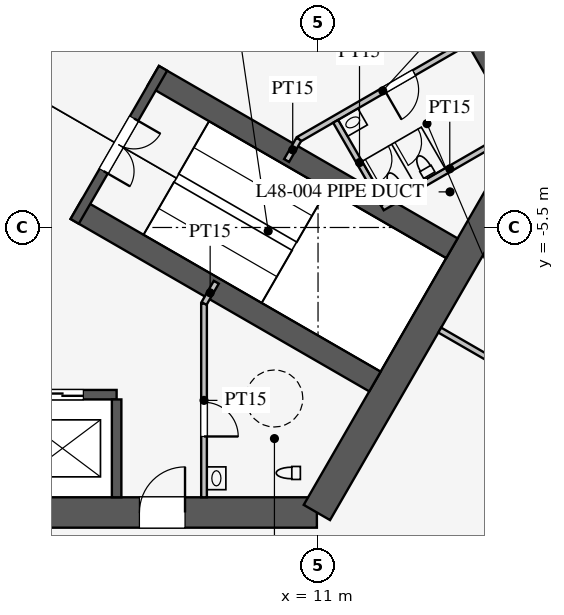
"""IFC4 building model, lengths in metres.
Left out: names, types, materials, properties, quantities, classifications, styles, units other than length and angle.
Written with IfcOpenShell. Run it as: python <this file> out.ifc"""

import sys

from ifc_helpers import new_model, si_unit, direction, frame, frame_2d, origin, place, context, subcontext, project, spatial, rectangle, extrude, element, fill, save


model = new_model("IFC4")
c1 = context("Model", 3, precision=1e-05, world=origin(), true_north=direction((0.0, 1.0)))
c2 = subcontext(c1, "Body", "Model", "MODEL_VIEW")
j1 = project(units=[si_unit("LENGTHUNIT", "METRE"), si_unit("PLANEANGLEUNIT", "RADIAN")], contexts=[c1])
p1 = place(None, origin())
s1 = spatial("IfcSite", under=j1, at=p1, CompositionType="ELEMENT")
p2 = place(p1, origin())
s2 = spatial("IfcBuilding", under=s1, at=p2, CompositionType="ELEMENT")
p3 = place(p2, frame((0.0, 0.0, 210.7)))
s3 = spatial("IfcBuildingStorey", under=s2, at=p3, CompositionType="ELEMENT", Elevation=210.7)
p4 = place(p3, frame((-10.97, -13.0, 0.0), z_axis=(0.0, 0.0, 1.0), x_axis=(1.0, 0.0, 0.0)))
e1 = element("IfcWall", 1, at=p4, inside=s3, PredefinedType="SHEAR", context=c2, shape_type="SweptSolid", body=[
    extrude(rectangle(XDim=21.939, YDim=0.8, at=frame_2d((10.97, 0.0))), origin(), (0.0, 0.0, 1.0), 4.2),
])
p5 = place(p4, frame((17.27, 0.0, 0.0)))
e2 = element("IfcOpeningElement", 2, at=p5, cuts=e1, PredefinedType="OPENING", context=c2, shape_type="SweptSolid", body=[
    extrude(rectangle(XDim=1.2, YDim=2.1, at=frame_2d((0.6, 1.05))), frame((0.0, 0.41, 0.0), z_axis=(0.0, -1.0, 0.0), x_axis=(1.0, 0.0, 0.0)), (0.0, 0.0, 1.0), 0.82),
])
p6 = place(p4, frame((3.47, 0.0, 0.0)))
e3 = element("IfcOpeningElement", 3, at=p6, cuts=e1, PredefinedType="OPENING", context=c2, shape_type="SweptSolid", body=[
    extrude(rectangle(XDim=1.2, YDim=2.1, at=frame_2d((0.6, 1.05))), frame((0.0, 0.41, 0.0), z_axis=(0.0, -1.0, 0.0), x_axis=(1.0, 0.0, 0.0)), (0.0, 0.0, 1.0), 0.82),
])
p7 = place(p3, frame((10.97, -13.0, 0.0), z_axis=(0.0, 0.0, 1.0), x_axis=(0.499995765644, 0.866027848477, 0.0)))
e4 = element("IfcWall", 4, at=p7, inside=s3, PredefinedType="SHEAR", context=c2, shape_type="SweptSolid", body=[
    extrude(rectangle(XDim=11.547, YDim=0.8, at=frame_2d((5.773, 0.0))), origin(), (0.0, 0.0, 1.0), 4.2),
])
p8 = place(p3, frame((16.743, -3.0, 0.0), z_axis=(0.0, 0.0, 1.0), x_axis=(-0.500002442456, 0.866023993627, 0.0)))
e5 = element("IfcWall", 5, at=p8, inside=s3, PredefinedType="SHEAR", context=c2, shape_type="SweptSolid", body=[
    extrude(rectangle(XDim=21.939, YDim=0.8, at=frame_2d((10.97, 0.0))), origin(), (0.0, 0.0, 1.0), 4.2),
])
p9 = place(p8, frame((17.27, 0.0, 0.0)))
e6 = element("IfcOpeningElement", 6, at=p9, cuts=e5, PredefinedType="OPENING", context=c2, shape_type="SweptSolid", body=[
    extrude(rectangle(XDim=1.2, YDim=2.1, at=frame_2d((0.6, 1.05))), frame((0.0, 0.41, 0.0), z_axis=(0.0, -1.0, 0.0), x_axis=(1.0, 0.0, 0.0)), (0.0, 0.0, 1.0), 0.82),
])
p10 = place(p8, frame((3.47, 0.0, 0.0)))
e7 = element("IfcOpeningElement", 7, at=p10, cuts=e5, PredefinedType="OPENING", context=c2, shape_type="SweptSolid", body=[
    extrude(rectangle(XDim=1.2, YDim=2.1, at=frame_2d((0.6, 1.05))), frame((0.0, 0.41, 0.0), z_axis=(0.0, -1.0, 0.0), x_axis=(1.0, 0.0, 0.0)), (0.0, 0.0, 1.0), 0.82),
])
p11 = place(p3, frame((-5.7, -9.9, 0.0), z_axis=(0.0, 0.0, 1.0), x_axis=(1.0, 0.0, 0.0)))
e8 = element("IfcWall", 8, at=p11, inside=s3, PredefinedType="SHEAR", context=c2, shape_type="SweptSolid", body=[
    extrude(rectangle(XDim=11.4, YDim=0.25, at=frame_2d((5.7, 0.0))), origin(), (0.0, 0.0, 1.0), 4.2),
])
p12 = place(p11, frame((0.875, 0.0, 0.0)))
e9 = element("IfcOpeningElement", 9, at=p12, cuts=e8, PredefinedType="OPENING", context=c2, shape_type="SweptSolid", body=[
    extrude(rectangle(XDim=1.1, YDim=2.2, at=frame_2d((0.55, 1.1))), frame((0.0, 0.135, 0.0), z_axis=(0.0, -1.0, 0.0), x_axis=(1.0, 0.0, 0.0)), (0.0, 0.0, 1.0), 0.27),
])
p13 = place(p11, frame((3.725, 0.0, 0.0)))
e10 = element("IfcOpeningElement", 10, at=p13, cuts=e8, PredefinedType="OPENING", context=c2, shape_type="SweptSolid", body=[
    extrude(rectangle(XDim=1.1, YDim=2.2, at=frame_2d((0.55, 1.1))), frame((0.0, 0.135, 0.0), z_axis=(0.0, -1.0, 0.0), x_axis=(1.0, 0.0, 0.0)), (0.0, 0.0, 1.0), 0.27),
])
p14 = place(p11, frame((6.575, 0.0, 0.0)))
e11 = element("IfcOpeningElement", 11, at=p14, cuts=e8, PredefinedType="OPENING", context=c2, shape_type="SweptSolid", body=[
    extrude(rectangle(XDim=1.1, YDim=2.2, at=frame_2d((0.55, 1.1))), frame((0.0, 0.135, 0.0), z_axis=(0.0, -1.0, 0.0), x_axis=(1.0, 0.0, 0.0)), (0.0, 0.0, 1.0), 0.27),
])
p15 = place(p11, frame((9.425, 0.0, 0.0)))
e12 = element("IfcOpeningElement", 12, at=p15, cuts=e8, PredefinedType="OPENING", context=c2, shape_type="SweptSolid", body=[
    extrude(rectangle(XDim=1.1, YDim=2.2, at=frame_2d((0.55, 1.1))), frame((0.0, 0.135, 0.0), z_axis=(0.0, -1.0, 0.0), x_axis=(1.0, 0.0, 0.0)), (0.0, 0.0, 1.0), 0.27),
])
p16 = place(p3, frame((5.7, -10.025, 0.0), z_axis=(0.0, 0.0, 1.0), x_axis=(0.0, -1.0, 0.0)))
e13 = element("IfcWall", 13, at=p16, inside=s3, PredefinedType="SHEAR", context=c2, shape_type="SweptSolid", body=[
    extrude(rectangle(XDim=2.575, YDim=0.25, at=frame_2d((1.288, 0.0))), origin(), (0.0, 0.0, 1.0), 4.2),
])
for number, where, z_axis, x_axis in (
    (14, (4.638, -5.016, 0.0), (0.0, 0.0, 1.0), (0.866, -0.5, 0.0)),
    (15, (6.663, -1.509, 0.0), (0.0, 0.0, 1.0), (0.866, -0.5, 0.0)),
):
    element("IfcWall", number, at=place(p3, frame(where, z_axis=z_axis, x_axis=x_axis)), inside=s3, PredefinedType="SHEAR", context=c2, shape_type="SweptSolid", body=[
        extrude(rectangle(XDim=9.075, YDim=0.6, at=frame_2d((4.538, 0.0))), origin(), (0.0, 0.0, 1.0), 4.2),
    ])
p17 = place(p3, frame((4.597, -5.339, 0.0), z_axis=(0.0, 0.0, 1.0), x_axis=(0.499984536904, 0.866034331223, 0.0)))
e16 = element("IfcWall", 16, at=p17, inside=s3, PredefinedType="SHEAR", context=c2, shape_type="SweptSolid", body=[
    extrude(rectangle(XDim=4.65, YDim=0.25, at=frame_2d((2.325, 0.0))), origin(), (0.0, 0.0, 1.0), 4.2),
])
p18 = place(p17, frame((1.525, 0.0, 0.0)))
e17 = element("IfcOpeningElement", 17, at=p18, cuts=e16, PredefinedType="OPENING", context=c2, shape_type="SweptSolid", body=[
    extrude(rectangle(XDim=1.6, YDim=2.1, at=frame_2d((0.8, 1.05))), frame((0.0, 0.135, 0.0), z_axis=(0.0, -1.0, 0.0), x_axis=(1.0, 0.0, 0.0)), (0.0, 0.0, 1.0), 0.27),
])
p19 = place(p3, frame((8.0, -7.5, 0.0), z_axis=(0.0, 0.0, 1.0), x_axis=(0.0, -1.0, 0.0)))
e18 = element("IfcWall", 18, at=p19, inside=s3, PredefinedType="PARTITIONING", context=c2, shape_type="SweptSolid", body=[
    extrude(rectangle(XDim=5.1, YDim=0.15, at=frame_2d((2.55, 0.0))), origin(), (0.0, 0.0, 1.0), 4.0),
])
p20 = place(p19, frame((2.6, 0.0, 0.0)))
e19 = element("IfcOpeningElement", 19, at=p20, cuts=e18, PredefinedType="OPENING", context=c2, shape_type="SweptSolid", body=[
    extrude(rectangle(XDim=0.9, YDim=2.1, at=frame_2d((0.45, 1.05))), frame((0.0, 0.085, 0.0), z_axis=(0.0, -1.0, 0.0), x_axis=(1.0, 0.0, 0.0)), (0.0, 0.0, 1.0), 0.17),
])
p21 = place(p3, frame((10.495, -3.178, 0.0), z_axis=(0.0, 0.0, 1.0), x_axis=(0.86602216432, 0.500005610874, 0.0)))
e20 = element("IfcWall", 20, at=p21, inside=s3, PredefinedType="PARTITIONING", context=c2, shape_type="SweptSolid", body=[
    extrude(rectangle(XDim=5.1, YDim=0.15, at=frame_2d((2.55, 0.0))), origin(), (0.0, 0.0, 1.0), 4.0),
])
p22 = place(p21, frame((2.6, 0.0, 0.0)))
e21 = element("IfcOpeningElement", 21, at=p22, cuts=e20, PredefinedType="OPENING", context=c2, shape_type="SweptSolid", body=[
    extrude(rectangle(XDim=0.9, YDim=2.1, at=frame_2d((0.45, 1.05))), frame((0.0, 0.085, 0.0), z_axis=(0.0, -1.0, 0.0), x_axis=(1.0, 0.0, 0.0)), (0.0, 0.0, 1.0), 0.17),
])
for number, where, z_axis, x_axis in (
    (22, (8.0, -7.5, 0.0), (0.0, 0.0, 1.0), (0.5, 0.866, 0.0)),
    (23, (10.495, -3.178, 0.0), (0.0, 0.0, 1.0), (-0.5, -0.866, 0.0)),
):
    element("IfcWall", number, at=place(p3, frame(where, z_axis=z_axis, x_axis=x_axis)), inside=s3, PredefinedType="PARTITIONING", context=c2, shape_type="SweptSolid", body=[
        extrude(rectangle(XDim=0.645, YDim=0.15, at=frame_2d((0.323, 0.0))), origin(), (0.0, 0.0, 1.0), 4.0),
    ])
p23 = place(p3, frame((12.691, -4.982, 0.0), z_axis=(0.0, 0.0, 1.0), x_axis=(0.8660249478, 0.500000789788, 0.0)))
e24 = element("IfcWall", 24, at=p23, inside=s3, PredefinedType="PARTITIONING", context=c2, shape_type="SweptSolid", body=[
    extrude(rectangle(XDim=4.1, YDim=0.15, at=frame_2d((2.05, 0.0))), origin(), (0.0, 0.0, 1.0), 4.0),
])
p24 = place(p3, frame((11.464, -2.706, 0.0), z_axis=(0.0, 0.0, 1.0), x_axis=(0.50001992892, -0.866013897511, 0.0)))
e25 = element("IfcWall", 25, at=p24, inside=s3, PredefinedType="PARTITIONING", context=c2, shape_type="SweptSolid", body=[
    extrude(rectangle(XDim=2.51, YDim=0.15, at=frame_2d((1.255, 0.0))), origin(), (0.0, 0.0, 1.0), 4.0),
])
p25 = place(p3, frame((14.203, -8.2, 0.0), z_axis=(0.0, 0.0, 1.0), x_axis=(0.866021600284, -0.500006587798, 0.0)))
e26 = element("IfcWall", 26, at=p25, inside=s3, PredefinedType="PARTITIONING", context=c2, shape_type="SweptSolid", body=[
    extrude(rectangle(XDim=14.95, YDim=0.15, at=frame_2d((7.475, 0.0))), origin(), (0.0, 0.0, 1.0), 2.4),
])
p26 = place(p3, frame((26.415, -15.231, 0.0), z_axis=(0.0, 0.0, 1.0), x_axis=(-0.50000091641, 0.866024874695, 0.0)))
e27 = element("IfcWall", 27, at=p26, inside=s3, PredefinedType="PARTITIONING", context=c2, shape_type="SweptSolid", body=[
    extrude(rectangle(XDim=52.796, YDim=0.12, at=frame_2d((26.398, 0.0))), origin(), (0.0, 0.0, 1.0), 2.9),
])
p27 = place(p26, frame((10.2, 0.0, 0.15)))
e28 = element("IfcOpeningElement", 28, at=p27, cuts=e27, PredefinedType="OPENING", context=c2, shape_type="SweptSolid", body=[
    extrude(rectangle(XDim=1.8, YDim=2.1, at=frame_2d((0.9, 1.05))), frame((0.0, 0.07, 0.0), z_axis=(0.0, -1.0, 0.0), x_axis=(1.0, 0.0, 0.0)), (0.0, 0.0, 1.0), 0.14),
])
p28 = place(p26, frame((40.8, 0.0, 0.15)))
e29 = element("IfcOpeningElement", 29, at=p28, cuts=e27, PredefinedType="OPENING", context=c2, shape_type="SweptSolid", body=[
    extrude(rectangle(XDim=1.8, YDim=2.1, at=frame_2d((0.9, 1.05))), frame((0.0, 0.07, 0.0), z_axis=(0.0, -1.0, 0.0), x_axis=(1.0, 0.0, 0.0)), (0.0, 0.0, 1.0), 0.14),
])
p29 = place(p20, origin())
e30 = element("IfcDoor", 30, at=p29, inside=s3, OperationType="SINGLE_SWING_RIGHT", PredefinedType="DOOR", context=c2, shape_type="SweptSolid", body=[
    extrude(rectangle(XDim=0.9, YDim=2.1, at=frame_2d((0.45, 1.05))), frame((0.0, 0.025, 0.0), z_axis=(0.0, -1.0, 0.0), x_axis=(1.0, 0.0, 0.0)), (0.0, 0.0, 1.0), 0.05),
])
fill(e19, e30)
p30 = place(p22, frame((0.9, 0.0, 0.0), z_axis=(0.0, 0.0, 1.0), x_axis=(-1.0, 0.0, 0.0)))
e31 = element("IfcDoor", 31, at=p30, inside=s3, OperationType="SINGLE_SWING_RIGHT", PredefinedType="DOOR", context=c2, shape_type="SweptSolid", body=[
    extrude(rectangle(XDim=0.9, YDim=2.1, at=frame_2d((0.45, 1.05))), frame((0.0, 0.025, 0.0), z_axis=(0.0, -1.0, 0.0), x_axis=(1.0, 0.0, 0.0)), (0.0, 0.0, 1.0), 0.05),
])
fill(e21, e31)
p31 = place(p18, frame((1.6, 0.0, 0.0), z_axis=(0.0, 0.0, 1.0), x_axis=(-1.0, 0.0, 0.0)))
e32 = element("IfcDoor", 32, at=p31, inside=s3, OperationType="DOUBLE_DOOR_SINGLE_SWING", PredefinedType="DOOR", context=c2, shape_type="SweptSolid", body=[
    extrude(rectangle(XDim=1.6, YDim=2.1, at=frame_2d((0.8, 1.05))), frame((0.0, 0.025, 0.0), z_axis=(0.0, -1.0, 0.0), x_axis=(1.0, 0.0, 0.0)), (0.0, 0.0, 1.0), 0.05),
])
fill(e17, e32)
p32 = place(p5, origin())
e33 = element("IfcDoor", 33, at=p32, inside=s3, OperationType="SINGLE_SWING_RIGHT", PredefinedType="DOOR", context=c2, shape_type="SweptSolid", body=[
    extrude(rectangle(XDim=1.2, YDim=2.1, at=frame_2d((0.6, 1.05))), frame((0.0, 0.025, 0.0), z_axis=(0.0, -1.0, 0.0), x_axis=(1.0, 0.0, 0.0)), (0.0, 0.0, 1.0), 0.05),
])
fill(e2, e33)
p33 = place(p15, origin())
e34 = element("IfcDoor", 34, at=p33, inside=s3, OperationType="DOUBLE_DOOR_SLIDING", PredefinedType="DOOR", context=c2, shape_type="SweptSolid", body=[
    extrude(rectangle(XDim=1.1, YDim=2.2, at=frame_2d((0.55, 1.1))), frame((0.0, 0.025, 0.0), z_axis=(0.0, -1.0, 0.0), x_axis=(1.0, 0.0, 0.0)), (0.0, 0.0, 1.0), 0.05),
])
fill(e12, e34)
save(model, sys.argv[1])
